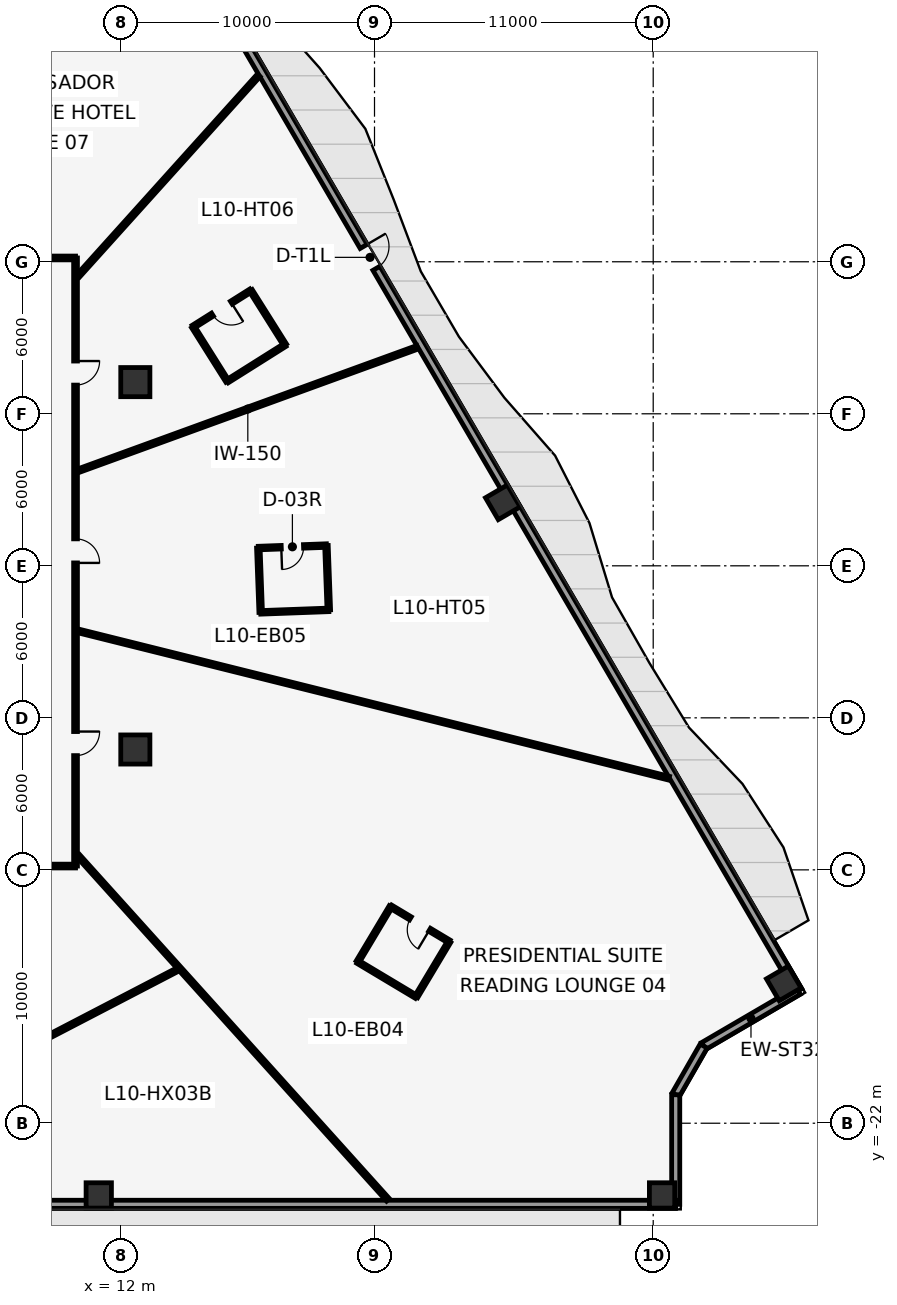
"""IFC4 building model, lengths in metres.
Left out: names, types, materials, properties, quantities, classifications, styles, units other than length and angle.
Written with IfcOpenShell. Run it as: python <this file> out.ifc"""

import sys

from ifc_helpers import new_model, si_unit, direction, frame, frame_2d, origin, origin_2d, place, context, subcontext, project, spatial, rectangle, hollow_rectangle, extrude, element, fill, save


model = new_model("IFC4")
c1 = context("Model", 3, precision=1e-05, world=origin(), true_north=direction((0.0, 1.0)))
c2 = subcontext(c1, "Body", "Model", "MODEL_VIEW")
j1 = project(units=[si_unit("LENGTHUNIT", "METRE"), si_unit("PLANEANGLEUNIT", "RADIAN")], contexts=[c1])
p1 = place(None, origin())
s1 = spatial("IfcSite", under=j1, at=p1, CompositionType="ELEMENT")
p2 = place(p1, origin())
s2 = spatial("IfcBuilding", under=s1, at=p2, CompositionType="ELEMENT")
p3 = place(p2, frame((0.0, 0.0, 50.4)))
s3 = spatial("IfcBuildingStorey", under=s2, at=p3, CompositionType="ELEMENT", Elevation=50.4)
for number, where, z_axis, x_axis in (
    (1, (12.56, -7.25, 0.0), (0.0, 0.0, 1.0), (1.0, 0.0, 0.0)),
    (2, (12.56, 7.25, 0.0), (0.0, 0.0, 1.0), (1.0, 0.0, 0.0)),
):
    element("IfcColumn", number, at=place(p3, frame(where, z_axis=z_axis, x_axis=x_axis)), inside=s3, PredefinedType="COLUMN", context=c2, shape_type="SweptSolid", body=[
        extrude(rectangle(XDim=1.15, YDim=1.15, at=origin_2d()), origin(), (0.0, 0.0, 1.0), 4.0),
    ])
for number, where, z_axis, x_axis in (
    (3, (11.117, -24.85, 0.0), (0.0, 0.0, 1.0), (1.0, 0.0, 0.0)),
    (4, (33.35, -24.85, 0.0), (0.0, 0.0, 1.0), (1.0, 0.0, 0.0)),
    (5, (38.154, -16.481, 0.0), (0.0, 0.0, 1.0), (-0.504, 0.863, 0.0)),
    (6, (27.065, 2.506, 0.0), (0.0, 0.0, 1.0), (-0.504, 0.863, 0.0)),
):
    element("IfcColumn", number, at=place(p3, frame(where, z_axis=z_axis, x_axis=x_axis)), inside=s3, PredefinedType="COLUMN", context=c2, shape_type="SweptSolid", body=[
        extrude(hollow_rectangle(XDim=1.0, YDim=1.0, WallThickness=0.06, at=origin_2d()), origin(), (0.0, 0.0, 1.0), 4.0),
    ])
p4 = place(p3, frame((4.923, 41.122, 0.0), z_axis=(0.0, 0.0, 1.0), x_axis=(0.504213113214, -0.863579258935, 0.0)))
e7 = element("IfcWall", 7, at=p4, inside=s3, PredefinedType="STANDARD", context=c2, shape_type="SweptSolid", body=[
    extrude(rectangle(XDim=67.041, YDim=0.32, at=frame_2d((33.521, 0.0))), origin(), (0.0, 0.0, 1.0), 3.75),
])
p5 = place(p4, frame((33.021, 0.0, 0.0)))
e8 = element("IfcOpeningElement", 8, at=p5, cuts=e7, PredefinedType="OPENING", context=c2, shape_type="SweptSolid", body=[
    extrude(rectangle(XDim=1.0, YDim=2.15, at=frame_2d((0.5, 1.075))), frame((0.0, 0.17, 0.0), z_axis=(0.0, -1.0, 0.0), x_axis=(1.0, 0.0, 0.0)), (0.0, 0.0, 1.0), 0.34),
])
p6 = place(p3, frame((38.726, -16.773, 0.0), z_axis=(0.0, 0.0, 1.0), x_axis=(-0.863569936823, -0.504229079105, 0.0)))
e9 = element("IfcWall", 9, at=p6, inside=s3, PredefinedType="STANDARD", context=c2, shape_type="SweptSolid", body=[
    extrude(rectangle(XDim=4.324, YDim=0.32, at=frame_2d((2.162, 0.0))), origin(), (0.0, 0.0, 1.0), 3.75),
])
p7 = place(p3, frame((34.992, -18.954, 0.0), z_axis=(0.0, 0.0, 1.0), x_axis=(-0.497881323344, -0.867245171717, 0.0)))
e10 = element("IfcWall", 10, at=p7, inside=s3, PredefinedType="STANDARD", context=c2, shape_type="SweptSolid", body=[
    extrude(rectangle(XDim=2.217, YDim=0.32, at=frame_2d((1.108, 0.0))), origin(), (0.0, 0.0, 1.0), 3.75),
])
p8 = place(p3, frame((33.888, -20.876, 0.0), z_axis=(0.0, 0.0, 1.0), x_axis=(0.0, -1.0, 0.0)))
e11 = element("IfcWall", 11, at=p8, inside=s3, PredefinedType="STANDARD", context=c2, shape_type="SweptSolid", body=[
    extrude(rectangle(XDim=4.324, YDim=0.32, at=frame_2d((2.162, 0.0))), origin(), (0.0, 0.0, 1.0), 3.75),
])
p9 = place(p3, frame((33.888, -25.2, 0.0), z_axis=(0.0, 0.0, 1.0), x_axis=(-1.0, 0.0, 0.0)))
e12 = element("IfcWall", 12, at=p9, inside=s3, PredefinedType="STANDARD", context=c2, shape_type="SweptSolid", body=[
    extrude(rectangle(XDim=67.776, YDim=0.32, at=frame_2d((33.888, 0.0))), origin(), (0.0, 0.0, 1.0), 3.75),
])
p10 = place(p9, frame((33.388, 0.0, 0.0)))
e13 = element("IfcOpeningElement", 13, at=p10, cuts=e12, PredefinedType="OPENING", context=c2, shape_type="SweptSolid", body=[
    extrude(rectangle(XDim=1.0, YDim=2.15, at=frame_2d((0.5, 1.075))), frame((0.0, 0.17, 0.0), z_axis=(0.0, -1.0, 0.0), x_axis=(1.0, 0.0, 0.0)), (0.0, 0.0, 1.0), 0.34),
])
p11 = place(p3, frame((-10.2, 12.15, 0.0), z_axis=(0.0, 0.0, 1.0), x_axis=(1.0, 0.0, 0.0)))
e14 = element("IfcWall", 14, at=p11, inside=s3, PredefinedType="PARTITIONING", context=c2, shape_type="SweptSolid", body=[
    extrude(rectangle(XDim=20.4, YDim=0.15, at=frame_2d((10.2, 0.0))), origin(), (0.0, 0.0, 1.0), 3.75),
])
p12 = place(p11, frame((15.998, 0.0, 0.0)))
e15 = element("IfcOpeningElement", 15, at=p12, cuts=e14, PredefinedType="OPENING", context=c2, shape_type="SweptSolid", body=[
    extrude(rectangle(XDim=0.95, YDim=2.15, at=frame_2d((0.475, 1.075))), frame((0.0, 0.085, 0.0), z_axis=(0.0, -1.0, 0.0), x_axis=(1.0, 0.0, 0.0)), (0.0, 0.0, 1.0), 0.17),
])
p13 = place(p11, frame((9.038, 0.0, 0.0)))
e16 = element("IfcOpeningElement", 16, at=p13, cuts=e14, PredefinedType="OPENING", context=c2, shape_type="SweptSolid", body=[
    extrude(rectangle(XDim=0.95, YDim=2.15, at=frame_2d((0.475, 1.075))), frame((0.0, 0.085, 0.0), z_axis=(0.0, -1.0, 0.0), x_axis=(1.0, 0.0, 0.0)), (0.0, 0.0, 1.0), 0.17),
])
p14 = place(p11, frame((2.764, 0.0, 0.0)))
e17 = element("IfcOpeningElement", 17, at=p14, cuts=e14, PredefinedType="OPENING", context=c2, shape_type="SweptSolid", body=[
    extrude(rectangle(XDim=0.95, YDim=2.15, at=frame_2d((0.475, 1.075))), frame((0.0, 0.085, 0.0), z_axis=(0.0, -1.0, 0.0), x_axis=(1.0, 0.0, 0.0)), (0.0, 0.0, 1.0), 0.17),
])
p15 = place(p3, frame((10.2, 12.15, 0.0), z_axis=(0.0, 0.0, 1.0), x_axis=(0.0, -1.0, 0.0)))
e18 = element("IfcWall", 18, at=p15, inside=s3, PredefinedType="PARTITIONING", context=c2, shape_type="SweptSolid", body=[
    extrude(rectangle(XDim=24.0, YDim=0.15, at=frame_2d((12.0, 0.0))), origin(), (0.0, 0.0, 1.0), 3.75),
])
p16 = place(p15, frame((18.691, 0.0, 0.0)))
e19 = element("IfcOpeningElement", 19, at=p16, cuts=e18, PredefinedType="OPENING", context=c2, shape_type="SweptSolid", body=[
    extrude(rectangle(XDim=0.95, YDim=2.15, at=frame_2d((0.475, 1.075))), frame((0.0, 0.085, 0.0), z_axis=(0.0, -1.0, 0.0), x_axis=(1.0, 0.0, 0.0)), (0.0, 0.0, 1.0), 0.17),
])
p17 = place(p15, frame((11.086, 0.0, 0.0)))
e20 = element("IfcOpeningElement", 20, at=p17, cuts=e18, PredefinedType="OPENING", context=c2, shape_type="SweptSolid", body=[
    extrude(rectangle(XDim=0.95, YDim=2.15, at=frame_2d((0.475, 1.075))), frame((0.0, 0.085, 0.0), z_axis=(0.0, -1.0, 0.0), x_axis=(1.0, 0.0, 0.0)), (0.0, 0.0, 1.0), 0.17),
])
p18 = place(p15, frame((4.068, 0.0, 0.0)))
e21 = element("IfcOpeningElement", 21, at=p18, cuts=e18, PredefinedType="OPENING", context=c2, shape_type="SweptSolid", body=[
    extrude(rectangle(XDim=0.95, YDim=2.15, at=frame_2d((0.475, 1.075))), frame((0.0, 0.085, 0.0), z_axis=(0.0, -1.0, 0.0), x_axis=(1.0, 0.0, 0.0)), (0.0, 0.0, 1.0), 0.17),
])
p19 = place(p3, frame((10.2, -11.85, 0.0), z_axis=(0.0, 0.0, 1.0), x_axis=(-1.0, 0.0, 0.0)))
e22 = element("IfcWall", 22, at=p19, inside=s3, PredefinedType="PARTITIONING", context=c2, shape_type="SweptSolid", body=[
    extrude(rectangle(XDim=20.4, YDim=0.15, at=frame_2d((10.2, 0.0))), origin(), (0.0, 0.0, 1.0), 3.75),
])
p20 = place(p19, frame((11.796, 0.0, 0.0)))
e23 = element("IfcOpeningElement", 23, at=p20, cuts=e22, PredefinedType="OPENING", context=c2, shape_type="SweptSolid", body=[
    extrude(rectangle(XDim=0.95, YDim=2.15, at=frame_2d((0.475, 1.075))), frame((0.0, 0.085, 0.0), z_axis=(0.0, -1.0, 0.0), x_axis=(1.0, 0.0, 0.0)), (0.0, 0.0, 1.0), 0.17),
])
p21 = place(p19, frame((3.913, 0.0, 0.0)))
e24 = element("IfcOpeningElement", 24, at=p21, cuts=e22, PredefinedType="OPENING", context=c2, shape_type="SweptSolid", body=[
    extrude(rectangle(XDim=0.95, YDim=2.15, at=frame_2d((0.475, 1.075))), frame((0.0, 0.085, 0.0), z_axis=(0.0, -1.0, 0.0), x_axis=(1.0, 0.0, 0.0)), (0.0, 0.0, 1.0), 0.17),
])
p22 = place(p3, frame((10.305, 3.751, 0.0), z_axis=(0.0, 0.0, 1.0), x_axis=(0.93969583409, 0.342011314716, 0.0)))
e25 = element("IfcWall", 25, at=p22, inside=s3, PredefinedType="PARTITIONING", context=c2, shape_type="SweptSolid", body=[
    extrude(rectangle(XDim=14.249, YDim=0.15, at=frame_2d((7.125, 0.0))), origin(), (0.0, 0.0, 1.0), 3.75),
])
p23 = place(p3, frame((10.305, 11.445, 0.0), z_axis=(0.0, 0.0, 1.0), x_axis=(0.6691357603, 0.743140184815, 0.0)))
e26 = element("IfcWall", 26, at=p23, inside=s3, PredefinedType="PARTITIONING", context=c2, shape_type="SweptSolid", body=[
    extrude(rectangle(XDim=10.646, YDim=0.15, at=frame_2d((5.323, 0.0))), origin(), (0.0, 0.0, 1.0), 3.75),
])
p24 = place(p3, frame((10.305, -11.445, 0.0), z_axis=(0.0, 0.0, 1.0), x_axis=(0.669137434477, -0.743138677355, 0.0)))
e27 = element("IfcWall", 27, at=p24, inside=s3, PredefinedType="PARTITIONING", context=c2, shape_type="SweptSolid", body=[
    extrude(rectangle(XDim=18.274, YDim=0.15, at=frame_2d((9.137, 0.0))), origin(), (0.0, 0.0, 1.0), 3.75),
])
p25 = place(p3, frame((10.305, -2.569, 0.0), z_axis=(0.0, 0.0, 1.0), x_axis=(0.970295876138, -0.241921294536, 0.0)))
e28 = element("IfcWall", 28, at=p25, inside=s3, PredefinedType="PARTITIONING", context=c2, shape_type="SweptSolid", body=[
    extrude(rectangle(XDim=24.033, YDim=0.15, at=frame_2d((12.017, 0.0))), origin(), (0.0, 0.0, 1.0), 3.75),
])
p26 = place(p3, frame((3.079, -21.732, 0.0), z_axis=(0.0, 0.0, 1.0), x_axis=(0.887285458414, 0.461220679596, 0.0)))
e29 = element("IfcWall", 29, at=p26, inside=s3, PredefinedType="PARTITIONING", context=c2, shape_type="SweptSolid", body=[
    extrude(rectangle(XDim=12.632, YDim=0.15, at=frame_2d((6.316, 0.0))), origin(), (0.0, 0.0, 1.0), 3.75),
])
p27 = place(p26, frame((5.866, 0.0, 0.0)))
e30 = element("IfcOpeningElement", 30, at=p27, cuts=e29, PredefinedType="OPENING", context=c2, shape_type="SweptSolid", body=[
    extrude(rectangle(XDim=0.9, YDim=2.1, at=frame_2d((0.45, 1.05))), frame((0.0, 0.085, 0.0), z_axis=(0.0, -1.0, 0.0), x_axis=(1.0, 0.0, 0.0)), (0.0, 0.0, 1.0), 0.17),
])
p28 = place(p3, frame((21.337, -15.629, 0.0), z_axis=(0.0, 0.0, 1.0), x_axis=(0.858092929116, -0.513494425482, 0.0)))
e31 = element("IfcWall", 31, at=p28, inside=s3, PredefinedType="PARTITIONING", context=c2, shape_type="SweptSolid", body=[
    extrude(rectangle(XDim=2.69, YDim=0.14, at=frame_2d((1.345, 0.0))), origin(), (0.0, 0.0, 1.0), 3.75),
])
p29 = place(p3, frame((23.645, -17.01, 0.0), z_axis=(0.0, 0.0, 1.0), x_axis=(0.51356253356, 0.858052168649, 0.0)))
e32 = element("IfcWall", 32, at=p29, inside=s3, PredefinedType="PARTITIONING", context=c2, shape_type="SweptSolid", body=[
    extrude(rectangle(XDim=2.54, YDim=0.14, at=frame_2d((1.27, 0.0))), origin(), (0.0, 0.0, 1.0), 3.75),
])
p30 = place(p3, frame((24.95, -14.831, 0.0), z_axis=(0.0, 0.0, 1.0), x_axis=(-0.858092929116, 0.513494425482, 0.0)))
e33 = element("IfcWall", 33, at=p30, inside=s3, PredefinedType="PARTITIONING", context=c2, shape_type="SweptSolid", body=[
    extrude(rectangle(XDim=2.69, YDim=0.14, at=frame_2d((1.345, 0.0))), origin(), (0.0, 0.0, 1.0), 3.75),
])
p31 = place(p30, frame((0.905, 0.0, 0.0)))
e34 = element("IfcOpeningElement", 34, at=p31, cuts=e33, PredefinedType="OPENING", context=c2, shape_type="SweptSolid", body=[
    extrude(rectangle(XDim=0.88, YDim=2.1, at=frame_2d((0.44, 1.05))), frame((0.0, 0.08, 0.0), z_axis=(0.0, -1.0, 0.0), x_axis=(1.0, 0.0, 0.0)), (0.0, 0.0, 1.0), 0.16),
])
p32 = place(p3, frame((22.641, -13.45, 0.0), z_axis=(0.0, 0.0, 1.0), x_axis=(-0.51356253356, -0.858052168649, 0.0)))
e35 = element("IfcWall", 35, at=p32, inside=s3, PredefinedType="PARTITIONING", context=c2, shape_type="SweptSolid", body=[
    extrude(rectangle(XDim=2.54, YDim=0.14, at=frame_2d((1.27, 0.0))), origin(), (0.0, 0.0, 1.0), 3.75),
])
p33 = place(p3, frame((17.508, -1.838, 0.0), z_axis=(0.0, 0.0, 1.0), x_axis=(0.999327457394, 0.036669236402, 0.0)))
e36 = element("IfcWall", 36, at=p33, inside=s3, PredefinedType="PARTITIONING", context=c2, shape_type="SweptSolid", body=[
    extrude(rectangle(XDim=2.69, YDim=0.14, at=frame_2d((1.345, 0.0))), origin(), (0.0, 0.0, 1.0), 3.75),
])
p34 = place(p3, frame((20.196, -1.739, 0.0), z_axis=(0.0, 0.0, 1.0), x_axis=(-0.03662060601, 0.999329240649, 0.0)))
e37 = element("IfcWall", 37, at=p34, inside=s3, PredefinedType="PARTITIONING", context=c2, shape_type="SweptSolid", body=[
    extrude(rectangle(XDim=2.54, YDim=0.14, at=frame_2d((1.27, 0.0))), origin(), (0.0, 0.0, 1.0), 3.75),
])
p35 = place(p3, frame((20.103, 0.799, 0.0), z_axis=(0.0, 0.0, 1.0), x_axis=(-0.999327579424, -0.036665910643, 0.0)))
e38 = element("IfcWall", 38, at=p35, inside=s3, PredefinedType="PARTITIONING", context=c2, shape_type="SweptSolid", body=[
    extrude(rectangle(XDim=2.69, YDim=0.14, at=frame_2d((1.345, 0.0))), origin(), (0.0, 0.0, 1.0), 3.75),
])
p36 = place(p35, frame((0.905, 0.0, 0.0)))
e39 = element("IfcOpeningElement", 39, at=p36, cuts=e38, PredefinedType="OPENING", context=c2, shape_type="SweptSolid", body=[
    extrude(rectangle(XDim=0.88, YDim=2.1, at=frame_2d((0.44, 1.05))), frame((0.0, 0.08, 0.0), z_axis=(0.0, -1.0, 0.0), x_axis=(1.0, 0.0, 0.0)), (0.0, 0.0, 1.0), 0.16),
])
p37 = place(p3, frame((17.415, 0.701, 0.0), z_axis=(0.0, 0.0, 1.0), x_axis=(0.036716593679, -0.999325718547, 0.0)))
e40 = element("IfcWall", 40, at=p37, inside=s3, PredefinedType="PARTITIONING", context=c2, shape_type="SweptSolid", body=[
    extrude(rectangle(XDim=2.54, YDim=0.14, at=frame_2d((1.27, 0.0))), origin(), (0.0, 0.0, 1.0), 3.75),
])
p38 = place(p3, frame((16.193, 7.283, 0.0), z_axis=(0.0, 0.0, 1.0), x_axis=(0.846152501914, 0.532940844282, 0.0)))
e41 = element("IfcWall", 41, at=p38, inside=s3, PredefinedType="PARTITIONING", context=c2, shape_type="SweptSolid", body=[
    extrude(rectangle(XDim=2.69, YDim=0.14, at=frame_2d((1.345, 0.0))), origin(), (0.0, 0.0, 1.0), 3.75),
])
p39 = place(p3, frame((18.469, 8.717, 0.0), z_axis=(0.0, 0.0, 1.0), x_axis=(-0.53290759563, 0.846173442339, 0.0)))
e42 = element("IfcWall", 42, at=p39, inside=s3, PredefinedType="PARTITIONING", context=c2, shape_type="SweptSolid", body=[
    extrude(rectangle(XDim=2.54, YDim=0.14, at=frame_2d((1.27, 0.0))), origin(), (0.0, 0.0, 1.0), 3.75),
])
p40 = place(p3, frame((17.115, 10.866, 0.0), z_axis=(0.0, 0.0, 1.0), x_axis=(-0.846193429407, -0.532875857991, 0.0)))
e43 = element("IfcWall", 43, at=p40, inside=s3, PredefinedType="PARTITIONING", context=c2, shape_type="SweptSolid", body=[
    extrude(rectangle(XDim=2.69, YDim=0.14, at=frame_2d((1.345, 0.0))), origin(), (0.0, 0.0, 1.0), 3.75),
])
p41 = place(p40, frame((0.905, 0.0, 0.0)))
e44 = element("IfcOpeningElement", 44, at=p41, cuts=e43, PredefinedType="OPENING", context=c2, shape_type="SweptSolid", body=[
    extrude(rectangle(XDim=0.88, YDim=2.1, at=frame_2d((0.44, 1.05))), frame((0.0, 0.08, 0.0), z_axis=(0.0, -1.0, 0.0), x_axis=(1.0, 0.0, 0.0)), (0.0, 0.0, 1.0), 0.16),
])
p42 = place(p3, frame((14.839, 9.433, 0.0), z_axis=(0.0, 0.0, 1.0), x_axis=(0.532864253358, -0.846200737115, 0.0)))
e45 = element("IfcWall", 45, at=p42, inside=s3, PredefinedType="PARTITIONING", context=c2, shape_type="SweptSolid", body=[
    extrude(rectangle(XDim=2.54, YDim=0.14, at=frame_2d((1.27, 0.0))), origin(), (0.0, 0.0, 1.0), 3.75),
])
p43 = place(p5, origin())
e46 = element("IfcDoor", 46, at=p43, inside=s3, OperationType="SINGLE_SWING_LEFT", PredefinedType="DOOR", context=c2, shape_type="SweptSolid", body=[
    extrude(rectangle(XDim=1.0, YDim=2.15, at=frame_2d((0.5, 1.075))), frame((0.0, 0.025, 0.0), z_axis=(0.0, -1.0, 0.0), x_axis=(1.0, 0.0, 0.0)), (0.0, 0.0, 1.0), 0.05),
])
fill(e8, e46)
p44 = place(p31, origin())
e47 = element("IfcDoor", 47, at=p44, inside=s3, OperationType="SINGLE_SWING_LEFT", PredefinedType="DOOR", context=c2, shape_type="SweptSolid", body=[
    extrude(rectangle(XDim=0.88, YDim=2.1, at=frame_2d((0.44, 1.05))), frame((0.0, 0.025, 0.0), z_axis=(0.0, -1.0, 0.0), x_axis=(1.0, 0.0, 0.0)), (0.0, 0.0, 1.0), 0.05),
])
fill(e34, e47)
p45 = place(p36, origin())
e48 = element("IfcDoor", 48, at=p45, inside=s3, OperationType="SINGLE_SWING_RIGHT", PredefinedType="DOOR", context=c2, shape_type="SweptSolid", body=[
    extrude(rectangle(XDim=0.88, YDim=2.1, at=frame_2d((0.44, 1.05))), frame((0.0, 0.025, 0.0), z_axis=(0.0, -1.0, 0.0), x_axis=(1.0, 0.0, 0.0)), (0.0, 0.0, 1.0), 0.05),
])
fill(e39, e48)
p46 = place(p41, origin())
e49 = element("IfcDoor", 49, at=p46, inside=s3, OperationType="SINGLE_SWING_LEFT", PredefinedType="DOOR", context=c2, shape_type="SweptSolid", body=[
    extrude(rectangle(XDim=0.88, YDim=2.1, at=frame_2d((0.44, 1.05))), frame((0.0, 0.025, 0.0), z_axis=(0.0, -1.0, 0.0), x_axis=(1.0, 0.0, 0.0)), (0.0, 0.0, 1.0), 0.05),
])
fill(e44, e49)
p47 = place(p16, origin())
e50 = element("IfcDoor", 50, at=p47, inside=s3, OperationType="SINGLE_SWING_LEFT", PredefinedType="DOOR", context=c2, shape_type="SweptSolid", body=[
    extrude(rectangle(XDim=0.95, YDim=2.15, at=frame_2d((0.475, 1.075))), frame((0.0, 0.025, 0.0), z_axis=(0.0, -1.0, 0.0), x_axis=(1.0, 0.0, 0.0)), (0.0, 0.0, 1.0), 0.05),
])
fill(e19, e50)
p48 = place(p17, origin())
e51 = element("IfcDoor", 51, at=p48, inside=s3, OperationType="SINGLE_SWING_RIGHT", PredefinedType="DOOR", context=c2, shape_type="SweptSolid", body=[
    extrude(rectangle(XDim=0.95, YDim=2.15, at=frame_2d((0.475, 1.075))), frame((0.0, 0.025, 0.0), z_axis=(0.0, -1.0, 0.0), x_axis=(1.0, 0.0, 0.0)), (0.0, 0.0, 1.0), 0.05),
])
fill(e20, e51)
p49 = place(p18, origin())
e52 = element("IfcDoor", 52, at=p49, inside=s3, OperationType="SINGLE_SWING_LEFT", PredefinedType="DOOR", context=c2, shape_type="SweptSolid", body=[
    extrude(rectangle(XDim=0.95, YDim=2.15, at=frame_2d((0.475, 1.075))), frame((0.0, 0.025, 0.0), z_axis=(0.0, -1.0, 0.0), x_axis=(1.0, 0.0, 0.0)), (0.0, 0.0, 1.0), 0.05),
])
fill(e21, e52)
save(model, sys.argv[1])
